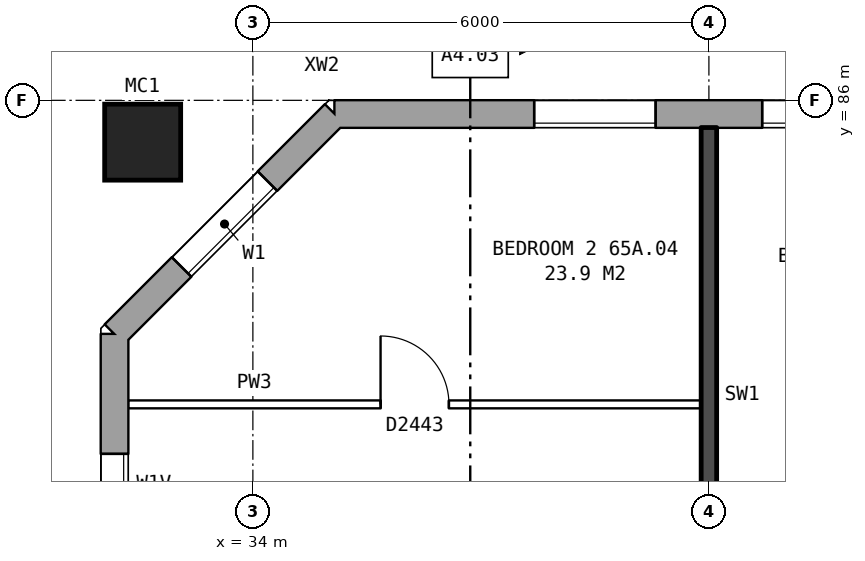
"""IFC4 building model, lengths in metres.
Left out: names, types, materials, properties, quantities, classifications, styles, units other than length and angle.
Written with IfcOpenShell. Run it as: python <this file> out.ifc"""

import sys

from ifc_helpers import new_model, si_unit, direction, frame, frame_2d, origin, origin_2d, place, context, subcontext, project, spatial, rectangle, hollow_rectangle, extrude, element, fill, save


model = new_model("IFC4")
c1 = context("Model", 3, precision=1e-05, world=origin(), true_north=direction((0.0, 1.0)))
c2 = subcontext(c1, "Body", "Model", "MODEL_VIEW")
j1 = project(units=[si_unit("LENGTHUNIT", "METRE"), si_unit("PLANEANGLEUNIT", "RADIAN")], contexts=[c1])
p1 = place(None, origin())
s1 = spatial("IfcSite", under=j1, at=p1, CompositionType="ELEMENT")
p2 = place(p1, origin())
s2 = spatial("IfcBuilding", under=s1, at=p2, CompositionType="ELEMENT")
p3 = place(p2, frame((0.0, 0.0, 230.7)))
s3 = spatial("IfcBuildingStorey", under=s2, at=p3, CompositionType="ELEMENT", Elevation=230.7)
p4 = place(p3, frame((32.55, 85.45, 0.0), z_axis=(0.0, 0.0, 1.0), x_axis=(1.0, 0.0, 0.0)))
e1 = element("IfcColumn", 1, at=p4, inside=s3, PredefinedType="COLUMN", context=c2, shape_type="SweptSolid", body=[
    extrude(hollow_rectangle(XDim=1.0, YDim=1.0, WallThickness=0.055, at=origin_2d()), origin(), (0.0, 0.0, 1.0), 3.1),
])
p5 = place(p3, frame((74.95, 85.82, 0.0), z_axis=(0.0, 0.0, 1.0), x_axis=(-1.0, 0.0, 0.0)))
e2 = element("IfcWall", 2, at=p5, inside=s3, PredefinedType="STANDARD", context=c2, shape_type="SweptSolid", body=[
    extrude(rectangle(XDim=39.875, YDim=0.36, at=frame_2d((19.938, 0.0))), origin(), (0.0, 0.0, 1.0), 2.85),
])
p6 = place(p5, frame((2.65, 0.0, 0.8)))
e3 = element("IfcOpeningElement", 3, at=p6, cuts=e2, PredefinedType="OPENING", context=c2, shape_type="SweptSolid", body=[
    extrude(rectangle(XDim=1.6, YDim=1.8, at=frame_2d((0.8, 0.9))), frame((0.0, 0.19, 0.0), z_axis=(0.0, -1.0, 0.0), x_axis=(1.0, 0.0, 0.0)), (0.0, 0.0, 1.0), 0.38),
])
p7 = place(p5, frame((5.65, 0.0, 0.8)))
e4 = element("IfcOpeningElement", 4, at=p7, cuts=e2, PredefinedType="OPENING", context=c2, shape_type="SweptSolid", body=[
    extrude(rectangle(XDim=1.6, YDim=1.8, at=frame_2d((0.8, 0.9))), frame((0.0, 0.19, 0.0), z_axis=(0.0, -1.0, 0.0), x_axis=(1.0, 0.0, 0.0)), (0.0, 0.0, 1.0), 0.38),
])
p8 = place(p5, frame((8.65, 0.0, 0.8)))
e5 = element("IfcOpeningElement", 5, at=p8, cuts=e2, PredefinedType="OPENING", context=c2, shape_type="SweptSolid", body=[
    extrude(rectangle(XDim=1.6, YDim=1.8, at=frame_2d((0.8, 0.9))), frame((0.0, 0.19, 0.0), z_axis=(0.0, -1.0, 0.0), x_axis=(1.0, 0.0, 0.0)), (0.0, 0.0, 1.0), 0.38),
])
p9 = place(p5, frame((11.65, 0.0, 0.8)))
e6 = element("IfcOpeningElement", 6, at=p9, cuts=e2, PredefinedType="OPENING", context=c2, shape_type="SweptSolid", body=[
    extrude(rectangle(XDim=1.6, YDim=1.8, at=frame_2d((0.8, 0.9))), frame((0.0, 0.19, 0.0), z_axis=(0.0, -1.0, 0.0), x_axis=(1.0, 0.0, 0.0)), (0.0, 0.0, 1.0), 0.38),
])
p10 = place(p5, frame((14.65, 0.0, 0.8)))
e7 = element("IfcOpeningElement", 7, at=p10, cuts=e2, PredefinedType="OPENING", context=c2, shape_type="SweptSolid", body=[
    extrude(rectangle(XDim=1.6, YDim=1.8, at=frame_2d((0.8, 0.9))), frame((0.0, 0.19, 0.0), z_axis=(0.0, -1.0, 0.0), x_axis=(1.0, 0.0, 0.0)), (0.0, 0.0, 1.0), 0.38),
])
p11 = place(p5, frame((17.15, 0.0, 1.7)))
e8 = element("IfcOpeningElement", 8, at=p11, cuts=e2, PredefinedType="OPENING", context=c2, shape_type="SweptSolid", body=[
    extrude(rectangle(XDim=0.6, YDim=0.9, at=frame_2d((0.3, 0.45))), frame((0.0, 0.19, 0.0), z_axis=(0.0, -1.0, 0.0), x_axis=(1.0, 0.0, 0.0)), (0.0, 0.0, 1.0), 0.38),
])
p12 = place(p5, frame((20.65, 0.0, 0.8)))
e9 = element("IfcOpeningElement", 9, at=p12, cuts=e2, PredefinedType="OPENING", context=c2, shape_type="SweptSolid", body=[
    extrude(rectangle(XDim=1.6, YDim=1.8, at=frame_2d((0.8, 0.9))), frame((0.0, 0.19, 0.0), z_axis=(0.0, -1.0, 0.0), x_axis=(1.0, 0.0, 0.0)), (0.0, 0.0, 1.0), 0.38),
])
p13 = place(p5, frame((24.7, 0.0, 0.8)))
e10 = element("IfcOpeningElement", 10, at=p13, cuts=e2, PredefinedType="OPENING", context=c2, shape_type="SweptSolid", body=[
    extrude(rectangle(XDim=1.0, YDim=1.8, at=frame_2d((0.5, 0.9))), frame((0.0, 0.19, 0.0), z_axis=(0.0, -1.0, 0.0), x_axis=(1.0, 0.0, 0.0)), (0.0, 0.0, 1.0), 0.38),
])
p14 = place(p5, frame((26.65, 0.0, 0.8)))
e11 = element("IfcOpeningElement", 11, at=p14, cuts=e2, PredefinedType="OPENING", context=c2, shape_type="SweptSolid", body=[
    extrude(rectangle(XDim=1.6, YDim=1.8, at=frame_2d((0.8, 0.9))), frame((0.0, 0.19, 0.0), z_axis=(0.0, -1.0, 0.0), x_axis=(1.0, 0.0, 0.0)), (0.0, 0.0, 1.0), 0.38),
])
p15 = place(p5, frame((29.65, 0.0, 0.8)))
e12 = element("IfcOpeningElement", 12, at=p15, cuts=e2, PredefinedType="OPENING", context=c2, shape_type="SweptSolid", body=[
    extrude(rectangle(XDim=1.6, YDim=1.8, at=frame_2d((0.8, 0.9))), frame((0.0, 0.19, 0.0), z_axis=(0.0, -1.0, 0.0), x_axis=(1.0, 0.0, 0.0)), (0.0, 0.0, 1.0), 0.38),
])
p16 = place(p5, frame((32.65, 0.0, 0.8)))
e13 = element("IfcOpeningElement", 13, at=p16, cuts=e2, PredefinedType="OPENING", context=c2, shape_type="SweptSolid", body=[
    extrude(rectangle(XDim=1.6, YDim=1.8, at=frame_2d((0.8, 0.9))), frame((0.0, 0.19, 0.0), z_axis=(0.0, -1.0, 0.0), x_axis=(1.0, 0.0, 0.0)), (0.0, 0.0, 1.0), 0.38),
])
p17 = place(p5, frame((35.65, 0.0, 0.8)))
e14 = element("IfcOpeningElement", 14, at=p17, cuts=e2, PredefinedType="OPENING", context=c2, shape_type="SweptSolid", body=[
    extrude(rectangle(XDim=1.6, YDim=1.8, at=frame_2d((0.8, 0.9))), frame((0.0, 0.19, 0.0), z_axis=(0.0, -1.0, 0.0), x_axis=(1.0, 0.0, 0.0)), (0.0, 0.0, 1.0), 0.38),
])
p18 = place(p5, frame((19.1, 0.0, 0.8)))
e15 = element("IfcOpeningElement", 15, at=p18, cuts=e2, PredefinedType="OPENING", context=c2, shape_type="SweptSolid", body=[
    extrude(rectangle(XDim=0.6, YDim=1.2, at=frame_2d((0.3, 0.6))), frame((0.0, 0.19, 0.0), z_axis=(0.0, -1.0, 0.0), x_axis=(1.0, 0.0, 0.0)), (0.0, 0.0, 1.0), 0.38),
])
p19 = place(p3, frame((35.075, 85.82, 0.0), z_axis=(0.0, 0.0, 1.0), x_axis=(-0.707106781187, -0.707106781187, 0.0)))
e16 = element("IfcWall", 16, at=p19, inside=s3, PredefinedType="STANDARD", context=c2, shape_type="SweptSolid", body=[
    extrude(rectangle(XDim=4.094, YDim=0.36, at=frame_2d((2.047, 0.0))), origin(), (0.0, 0.0, 1.0), 2.85),
])
p20 = place(p19, frame((1.247, 0.0, 0.8)))
e17 = element("IfcOpeningElement", 17, at=p20, cuts=e16, PredefinedType="OPENING", context=c2, shape_type="SweptSolid", body=[
    extrude(rectangle(XDim=1.6, YDim=1.8, at=frame_2d((0.8, 0.9))), frame((0.0, 0.19, 0.0), z_axis=(0.0, -1.0, 0.0), x_axis=(1.0, 0.0, 0.0)), (0.0, 0.0, 1.0), 0.38),
])
p21 = place(p3, frame((32.18, 82.925, 0.0), z_axis=(0.0, 0.0, 1.0), x_axis=(0.0, -1.0, 0.0)))
e18 = element("IfcWall", 18, at=p21, inside=s3, PredefinedType="STANDARD", context=c2, shape_type="SweptSolid", body=[
    extrude(rectangle(XDim=25.851, YDim=0.36, at=frame_2d((12.925, 0.0))), origin(), (0.0, 0.0, 1.0), 2.85),
])
p22 = place(p21, frame((1.575, 0.0, 1.7)))
e19 = element("IfcOpeningElement", 19, at=p22, cuts=e18, PredefinedType="OPENING", context=c2, shape_type="SweptSolid", body=[
    extrude(rectangle(XDim=0.8, YDim=0.9, at=frame_2d((0.4, 0.45))), frame((0.0, 0.19, 0.0), z_axis=(0.0, -1.0, 0.0), x_axis=(1.0, 0.0, 0.0)), (0.0, 0.0, 1.0), 0.38),
])
p23 = place(p21, frame((4.625, 0.0, 0.8)))
e20 = element("IfcOpeningElement", 20, at=p23, cuts=e18, PredefinedType="OPENING", context=c2, shape_type="SweptSolid", body=[
    extrude(rectangle(XDim=1.6, YDim=1.8, at=frame_2d((0.8, 0.9))), frame((0.0, 0.19, 0.0), z_axis=(0.0, -1.0, 0.0), x_axis=(1.0, 0.0, 0.0)), (0.0, 0.0, 1.0), 0.38),
])
p24 = place(p21, frame((19.625, 0.0, 0.8)))
e21 = element("IfcOpeningElement", 21, at=p24, cuts=e18, PredefinedType="OPENING", context=c2, shape_type="SweptSolid", body=[
    extrude(rectangle(XDim=1.6, YDim=1.8, at=frame_2d((0.8, 0.9))), frame((0.0, 0.19, 0.0), z_axis=(0.0, -1.0, 0.0), x_axis=(1.0, 0.0, 0.0)), (0.0, 0.0, 1.0), 0.38),
])
p25 = place(p21, frame((21.525, 0.0, 0.8)))
e22 = element("IfcOpeningElement", 22, at=p25, cuts=e18, PredefinedType="OPENING", context=c2, shape_type="SweptSolid", body=[
    extrude(rectangle(XDim=1.6, YDim=1.8, at=frame_2d((0.8, 0.9))), frame((0.0, 0.19, 0.0), z_axis=(0.0, -1.0, 0.0), x_axis=(1.0, 0.0, 0.0)), (0.0, 0.0, 1.0), 0.38),
])
p26 = place(p21, frame((2.675, 0.0, 0.8)))
e23 = element("IfcOpeningElement", 23, at=p26, cuts=e18, PredefinedType="OPENING", context=c2, shape_type="SweptSolid", body=[
    extrude(rectangle(XDim=1.6, YDim=1.8, at=frame_2d((0.8, 0.9))), frame((0.0, 0.19, 0.0), z_axis=(0.0, -1.0, 0.0), x_axis=(1.0, 0.0, 0.0)), (0.0, 0.0, 1.0), 0.38),
])
p27 = place(p21, frame((23.425, 0.0, 1.7)))
e24 = element("IfcOpeningElement", 24, at=p27, cuts=e18, PredefinedType="OPENING", context=c2, shape_type="SweptSolid", body=[
    extrude(rectangle(XDim=0.8, YDim=0.9, at=frame_2d((0.4, 0.45))), frame((0.0, 0.19, 0.0), z_axis=(0.0, -1.0, 0.0), x_axis=(1.0, 0.0, 0.0)), (0.0, 0.0, 1.0), 0.38),
])
p28 = place(p3, frame((32.36, 82.0, 0.0), z_axis=(0.0, 0.0, 1.0), x_axis=(1.0, 0.0, 0.0)))
e25 = element("IfcWall", 25, at=p28, inside=s3, PredefinedType="PARTITIONING", context=c2, shape_type="SweptSolid", body=[
    extrude(rectangle(XDim=7.54, YDim=0.1, at=frame_2d((3.77, 0.0))), origin(), (0.0, 0.0, 1.0), 2.85),
])
p29 = place(p28, frame((3.32, 0.0, 0.0)))
e26 = element("IfcOpeningElement", 26, at=p29, cuts=e25, PredefinedType="OPENING", context=c2, shape_type="SweptSolid", body=[
    extrude(rectangle(XDim=0.9, YDim=2.1, at=frame_2d((0.45, 1.05))), frame((0.0, 0.06, 0.0), z_axis=(0.0, -1.0, 0.0), x_axis=(1.0, 0.0, 0.0)), (0.0, 0.0, 1.0), 0.12),
])
p30 = place(p3, frame((40.0, 76.2, 0.0), z_axis=(0.0, 0.0, 1.0), x_axis=(0.0, 1.0, 0.0)))
e27 = element("IfcWall", 27, at=p30, inside=s3, PredefinedType="SOLIDWALL", context=c2, shape_type="SweptSolid", body=[
    extrude(rectangle(XDim=9.44, YDim=0.2, at=frame_2d((4.72, 0.0))), origin(), (0.0, 0.0, 1.0), 2.85),
])
p31 = place(p30, frame((1.5, 0.0, 0.0)))
e28 = element("IfcOpeningElement", 28, at=p31, cuts=e27, PredefinedType="OPENING", context=c2, shape_type="SweptSolid", body=[
    extrude(rectangle(XDim=0.9, YDim=2.1, at=frame_2d((0.45, 1.05))), frame((0.0, 0.11, 0.0), z_axis=(0.0, -1.0, 0.0), x_axis=(1.0, 0.0, 0.0)), (0.0, 0.0, 1.0), 0.22),
])
p32 = place(p16, origin())
e29 = element("IfcWindow", 29, at=p32, inside=s3, PartitioningType="SINGLE_PANEL", PredefinedType="WINDOW", context=c2, shape_type="SweptSolid", body=[
    extrude(rectangle(XDim=1.6, YDim=1.8, at=frame_2d((0.8, 0.9))), frame((0.0, 0.15, 0.0), z_axis=(0.0, -1.0, 0.0), x_axis=(1.0, 0.0, 0.0)), (0.0, 0.0, 1.0), 0.06),
])
fill(e13, e29)
p33 = place(p17, origin())
e30 = element("IfcWindow", 30, at=p33, inside=s3, PartitioningType="SINGLE_PANEL", PredefinedType="WINDOW", context=c2, shape_type="SweptSolid", body=[
    extrude(rectangle(XDim=1.6, YDim=1.8, at=frame_2d((0.8, 0.9))), frame((0.0, 0.15, 0.0), z_axis=(0.0, -1.0, 0.0), x_axis=(1.0, 0.0, 0.0)), (0.0, 0.0, 1.0), 0.06),
])
fill(e14, e30)
p34 = place(p20, origin())
e31 = element("IfcWindow", 31, at=p34, inside=s3, PartitioningType="SINGLE_PANEL", PredefinedType="WINDOW", context=c2, shape_type="SweptSolid", body=[
    extrude(rectangle(XDim=1.6, YDim=1.8, at=frame_2d((0.8, 0.9))), frame((0.0, 0.15, 0.0), z_axis=(0.0, -1.0, 0.0), x_axis=(1.0, 0.0, 0.0)), (0.0, 0.0, 1.0), 0.06),
])
fill(e17, e31)
p35 = place(p22, origin())
e32 = element("IfcWindow", 32, at=p35, inside=s3, PartitioningType="SINGLE_PANEL", PredefinedType="WINDOW", context=c2, shape_type="SweptSolid", body=[
    extrude(rectangle(XDim=0.8, YDim=0.9, at=frame_2d((0.4, 0.45))), frame((0.0, 0.15, 0.0), z_axis=(0.0, -1.0, 0.0), x_axis=(1.0, 0.0, 0.0)), (0.0, 0.0, 1.0), 0.06),
])
fill(e19, e32)
p36 = place(p29, origin())
e33 = element("IfcDoor", 33, at=p36, inside=s3, OperationType="SINGLE_SWING_LEFT", PredefinedType="DOOR", context=c2, shape_type="SweptSolid", body=[
    extrude(rectangle(XDim=0.9, YDim=2.1, at=frame_2d((0.45, 1.05))), frame((0.0, 0.025, 0.0), z_axis=(0.0, -1.0, 0.0), x_axis=(1.0, 0.0, 0.0)), (0.0, 0.0, 1.0), 0.05),
])
fill(e26, e33)
save(model, sys.argv[1])
